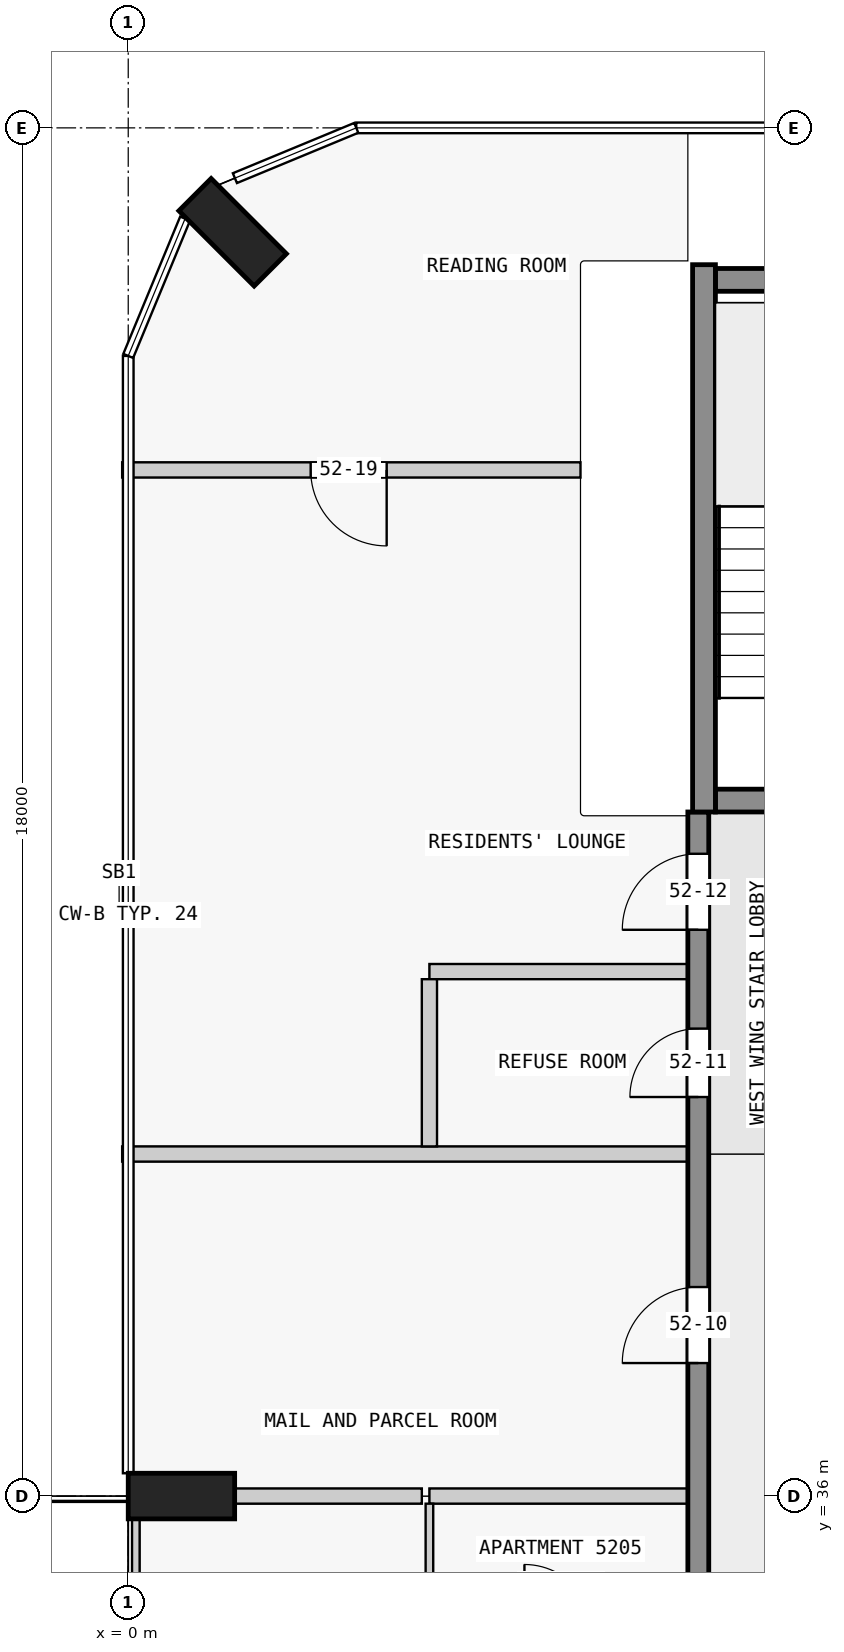
"""IFC4 building model, lengths in metres.
Left out: names, types, materials, properties, quantities, classifications, styles, units other than length and angle.
Written with IfcOpenShell. Run it as: python <this file> out.ifc"""

import sys

from ifc_helpers import new_model, si_unit, direction, frame, frame_2d, origin, origin_2d, place, context, subcontext, project, spatial, rectangle, extrude, element, fill, save


model = new_model("IFC4")
c1 = context("Model", 3, precision=1e-05, world=origin(), true_north=direction((0.0, 1.0)))
c2 = subcontext(c1, "Body", "Model", "MODEL_VIEW")
j1 = project(units=[si_unit("LENGTHUNIT", "METRE"), si_unit("PLANEANGLEUNIT", "RADIAN")], contexts=[c1])
p1 = place(None, origin())
s1 = spatial("IfcSite", under=j1, at=p1, CompositionType="ELEMENT")
p2 = place(p1, origin())
s2 = spatial("IfcBuilding", under=s1, at=p2, CompositionType="ELEMENT")
p3 = place(p2, frame((0.0, 0.0, 201.4)))
s3 = spatial("IfcBuildingStorey", under=s2, at=p3, CompositionType="ELEMENT", Elevation=201.4)
for number, where, z_axis, x_axis in (
    (1, (1.374, 52.626, 0.0), (0.0, 0.0, 1.0), (0.707, 0.707, 0.0)),
    (2, (0.7, 36.0, 0.0), (0.0, 0.0, 1.0), (0.0, 1.0, 0.0)),
):
    element("IfcColumn", number, at=place(p3, frame(where, z_axis=z_axis, x_axis=x_axis)), inside=s3, PredefinedType="COLUMN", context=c2, shape_type="SweptSolid", body=[
        extrude(rectangle(XDim=0.6, YDim=1.4, at=origin_2d()), origin(), (0.0, 0.0, 1.0), 3.5),
    ])
p4 = place(p3, frame((7.725, 45.15, 0.0), z_axis=(0.0, 0.0, 1.0), x_axis=(1.0, 0.0, 0.0)))
e3 = element("IfcWall", 3, at=p4, inside=s3, PredefinedType="SHEAR", context=c2, shape_type="SweptSolid", body=[
    extrude(rectangle(XDim=2.55, YDim=0.3, at=frame_2d((1.275, 0.0))), origin(), (0.0, 0.0, 1.0), 3.5),
])
p5 = place(p4, frame((0.725, 0.0, 0.0)))
e4 = element("IfcOpeningElement", 4, at=p5, cuts=e3, PredefinedType="OPENING", context=c2, shape_type="SweptSolid", body=[
    extrude(rectangle(XDim=1.1, YDim=2.1, at=frame_2d((0.55, 1.05))), frame((0.0, 0.16, 0.0), z_axis=(0.0, -1.0, 0.0), x_axis=(1.0, 0.0, 0.0)), (0.0, 0.0, 1.0), 0.32),
])
p6 = place(p3, frame((7.725, 52.0, 0.0), z_axis=(0.0, 0.0, 1.0), x_axis=(1.0, 0.0, 0.0)))
e5 = element("IfcWall", 5, at=p6, inside=s3, PredefinedType="SHEAR", context=c2, shape_type="SweptSolid", body=[
    extrude(rectangle(XDim=2.55, YDim=0.3, at=frame_2d((1.275, 0.0))), origin(), (0.0, 0.0, 1.0), 3.5),
])
p7 = place(p3, frame((7.575, 45.0, 0.0), z_axis=(0.0, 0.0, 1.0), x_axis=(0.0, 1.0, 0.0)))
e6 = element("IfcWall", 6, at=p7, inside=s3, PredefinedType="SHEAR", context=c2, shape_type="SweptSolid", body=[
    extrude(rectangle(XDim=7.2, YDim=0.3, at=frame_2d((3.6, 0.0))), origin(), (0.0, 0.0, 1.0), 3.5),
])
p8 = place(p3, frame((7.5, 18.0, 0.0), z_axis=(0.0, 0.0, 1.0), x_axis=(0.0, 1.0, 0.0)))
e7 = element("IfcWall", 7, at=p8, inside=s3, PredefinedType="SHEAR", context=c2, shape_type="SweptSolid", body=[
    extrude(rectangle(XDim=27.0, YDim=0.275, at=frame_2d((13.5, 0.0))), origin(), (0.0, 0.0, 1.0), 3.25),
])
p9 = place(p8, frame((1.75, 0.0, 0.0)))
e8 = element("IfcOpeningElement", 8, at=p9, cuts=e7, PredefinedType="OPENING", context=c2, shape_type="SweptSolid", body=[
    extrude(rectangle(XDim=1.0, YDim=2.1, at=frame_2d((0.5, 1.05))), frame((0.0, 0.147, 0.0), z_axis=(0.0, -1.0, 0.0), x_axis=(1.0, 0.0, 0.0)), (0.0, 0.0, 1.0), 0.295),
])
p10 = place(p8, frame((5.85, 0.0, 0.0)))
e9 = element("IfcOpeningElement", 9, at=p10, cuts=e7, PredefinedType="OPENING", context=c2, shape_type="SweptSolid", body=[
    extrude(rectangle(XDim=1.8, YDim=2.1, at=frame_2d((0.9, 1.05))), frame((0.0, 0.147, 0.0), z_axis=(0.0, -1.0, 0.0), x_axis=(1.0, 0.0, 0.0)), (0.0, 0.0, 1.0), 0.295),
])
p11 = place(p8, frame((13.05, 0.0, 0.0)))
e10 = element("IfcOpeningElement", 10, at=p11, cuts=e7, PredefinedType="OPENING", context=c2, shape_type="SweptSolid", body=[
    extrude(rectangle(XDim=1.0, YDim=2.1, at=frame_2d((0.5, 1.05))), frame((0.0, 0.147, 0.0), z_axis=(0.0, -1.0, 0.0), x_axis=(1.0, 0.0, 0.0)), (0.0, 0.0, 1.0), 0.295),
])
p12 = place(p8, frame((19.75, 0.0, 0.0)))
e11 = element("IfcOpeningElement", 11, at=p12, cuts=e7, PredefinedType="OPENING", context=c2, shape_type="SweptSolid", body=[
    extrude(rectangle(XDim=1.0, YDim=2.1, at=frame_2d((0.5, 1.05))), frame((0.0, 0.147, 0.0), z_axis=(0.0, -1.0, 0.0), x_axis=(1.0, 0.0, 0.0)), (0.0, 0.0, 1.0), 0.295),
])
p13 = place(p8, frame((23.25, 0.0, 0.0)))
e12 = element("IfcOpeningElement", 12, at=p13, cuts=e7, PredefinedType="OPENING", context=c2, shape_type="SweptSolid", body=[
    extrude(rectangle(XDim=0.9, YDim=2.1, at=frame_2d((0.45, 1.05))), frame((0.0, 0.147, 0.0), z_axis=(0.0, -1.0, 0.0), x_axis=(1.0, 0.0, 0.0)), (0.0, 0.0, 1.0), 0.295),
])
p14 = place(p8, frame((25.45, 0.0, 0.0)))
e13 = element("IfcOpeningElement", 13, at=p14, cuts=e7, PredefinedType="OPENING", context=c2, shape_type="SweptSolid", body=[
    extrude(rectangle(XDim=1.0, YDim=2.1, at=frame_2d((0.5, 1.05))), frame((0.0, 0.147, 0.0), z_axis=(0.0, -1.0, 0.0), x_axis=(1.0, 0.0, 0.0)), (0.0, 0.0, 1.0), 0.295),
])
p15 = place(p3, frame((0.1, 31.5, 0.0), z_axis=(0.0, 0.0, 1.0), x_axis=(0.0, 1.0, 0.0)))
e14 = element("IfcWall", 14, at=p15, inside=s3, PredefinedType="STANDARD", context=c2, shape_type="SweptSolid", body=[
    extrude(rectangle(XDim=4.5, YDim=0.1, at=frame_2d((2.25, 0.0))), origin(), (0.0, 0.0, 1.0), 3.25),
])
p16 = place(p15, frame((1.05, 0.0, 0.0)))
e15 = element("IfcOpeningElement", 15, at=p16, cuts=e14, PredefinedType="OPENING", context=c2, shape_type="SweptSolid", body=[
    extrude(rectangle(XDim=2.4, YDim=2.4, at=frame_2d((1.2, 1.2))), frame((0.0, 0.06, 0.0), z_axis=(0.0, -1.0, 0.0), x_axis=(1.0, 0.0, 0.0)), (0.0, 0.0, 1.0), 0.12),
])
p17 = place(p3, frame((7.363, 36.0, 0.0), z_axis=(0.0, 0.0, 1.0), x_axis=(-1.0, 0.0, 0.0)))
e16 = element("IfcWall", 16, at=p17, inside=s3, PredefinedType="PARTITIONING", context=c2, shape_type="SweptSolid", body=[
    extrude(rectangle(XDim=3.4, YDim=0.2, at=frame_2d((1.7, 0.0))), origin(), (0.0, 0.0, 1.0), 3.25),
])
p18 = place(p3, frame((1.4, 36.0, 0.0), z_axis=(0.0, 0.0, 1.0), x_axis=(1.0, 0.0, 0.0)))
e17 = element("IfcWall", 17, at=p18, inside=s3, PredefinedType="PARTITIONING", context=c2, shape_type="SweptSolid", body=[
    extrude(rectangle(XDim=2.463, YDim=0.2, at=frame_2d((1.231, 0.0))), origin(), (0.0, 0.0, 1.0), 3.25),
])
p19 = place(p3, frame((7.363, 40.5, 0.0), z_axis=(0.0, 0.0, 1.0), x_axis=(-1.0, 0.0, 0.0)))
e18 = element("IfcWall", 18, at=p19, inside=s3, PredefinedType="PARTITIONING", context=c2, shape_type="SweptSolid", body=[
    extrude(rectangle(XDim=7.443, YDim=0.2, at=frame_2d((3.721, 0.0))), origin(), (0.0, 0.0, 1.0), 3.25),
])
p20 = place(p3, frame((7.363, 42.9, 0.0), z_axis=(0.0, 0.0, 1.0), x_axis=(-1.0, 0.0, 0.0)))
e19 = element("IfcWall", 19, at=p20, inside=s3, PredefinedType="PARTITIONING", context=c2, shape_type="SweptSolid", body=[
    extrude(rectangle(XDim=3.4, YDim=0.2, at=frame_2d((1.7, 0.0))), origin(), (0.0, 0.0, 1.0), 3.25),
])
p21 = place(p3, frame((5.95, 49.5, 0.0), z_axis=(0.0, 0.0, 1.0), x_axis=(-1.0, 0.0, 0.0)))
e20 = element("IfcWall", 20, at=p21, inside=s3, PredefinedType="PARTITIONING", context=c2, shape_type="SweptSolid", body=[
    extrude(rectangle(XDim=6.03, YDim=0.2, at=frame_2d((3.015, 0.0))), origin(), (0.0, 0.0, 1.0), 3.25),
])
p22 = place(p21, frame((2.55, 0.0, 0.0)))
e21 = element("IfcOpeningElement", 21, at=p22, cuts=e20, PredefinedType="OPENING", context=c2, shape_type="SweptSolid", body=[
    extrude(rectangle(XDim=1.0, YDim=2.1, at=frame_2d((0.5, 1.05))), frame((0.0, 0.11, 0.0), z_axis=(0.0, -1.0, 0.0), x_axis=(1.0, 0.0, 0.0)), (0.0, 0.0, 1.0), 0.22),
])
p23 = place(p3, frame((3.962, 35.9, 0.0), z_axis=(0.0, 0.0, 1.0), x_axis=(0.0, -1.0, 0.0)))
e22 = element("IfcWall", 22, at=p23, inside=s3, PredefinedType="PARTITIONING", context=c2, shape_type="SweptSolid", body=[
    extrude(rectangle(XDim=1.65, YDim=0.1, at=frame_2d((0.825, 0.0))), origin(), (0.0, 0.0, 1.0), 3.25),
])
p24 = place(p3, frame((3.962, 42.8, 0.0), z_axis=(0.0, 0.0, 1.0), x_axis=(0.0, -1.0, 0.0)))
e23 = element("IfcWall", 23, at=p24, inside=s3, PredefinedType="PARTITIONING", context=c2, shape_type="SweptSolid", body=[
    extrude(rectangle(XDim=2.2, YDim=0.2, at=frame_2d((1.1, 0.0))), origin(), (0.0, 0.0, 1.0), 3.25),
])
p25 = place(p12, origin())
e24 = element("IfcDoor", 24, at=p25, inside=s3, OperationType="SINGLE_SWING_RIGHT", PredefinedType="DOOR", context=c2, shape_type="SweptSolid", body=[
    extrude(rectangle(XDim=1.0, YDim=2.1, at=frame_2d((0.5, 1.05))), frame((0.0, 0.025, 0.0), z_axis=(0.0, -1.0, 0.0), x_axis=(1.0, 0.0, 0.0)), (0.0, 0.0, 1.0), 0.05),
])
fill(e11, e24)
p26 = place(p13, origin())
e25 = element("IfcDoor", 25, at=p26, inside=s3, OperationType="SINGLE_SWING_RIGHT", PredefinedType="DOOR", context=c2, shape_type="SweptSolid", body=[
    extrude(rectangle(XDim=0.9, YDim=2.1, at=frame_2d((0.45, 1.05))), frame((0.0, 0.025, 0.0), z_axis=(0.0, -1.0, 0.0), x_axis=(1.0, 0.0, 0.0)), (0.0, 0.0, 1.0), 0.05),
])
fill(e12, e25)
p27 = place(p14, origin())
e26 = element("IfcDoor", 26, at=p27, inside=s3, OperationType="SINGLE_SWING_RIGHT", PredefinedType="DOOR", context=c2, shape_type="SweptSolid", body=[
    extrude(rectangle(XDim=1.0, YDim=2.1, at=frame_2d((0.5, 1.05))), frame((0.0, 0.025, 0.0), z_axis=(0.0, -1.0, 0.0), x_axis=(1.0, 0.0, 0.0)), (0.0, 0.0, 1.0), 0.05),
])
fill(e13, e26)
p28 = place(p22, origin())
e27 = element("IfcDoor", 27, at=p28, inside=s3, OperationType="SINGLE_SWING_RIGHT", PredefinedType="DOOR", context=c2, shape_type="SweptSolid", body=[
    extrude(rectangle(XDim=1.0, YDim=2.1, at=frame_2d((0.5, 1.05))), frame((0.0, 0.025, 0.0), z_axis=(0.0, -1.0, 0.0), x_axis=(1.0, 0.0, 0.0)), (0.0, 0.0, 1.0), 0.05),
])
fill(e21, e27)
save(model, sys.argv[1])
